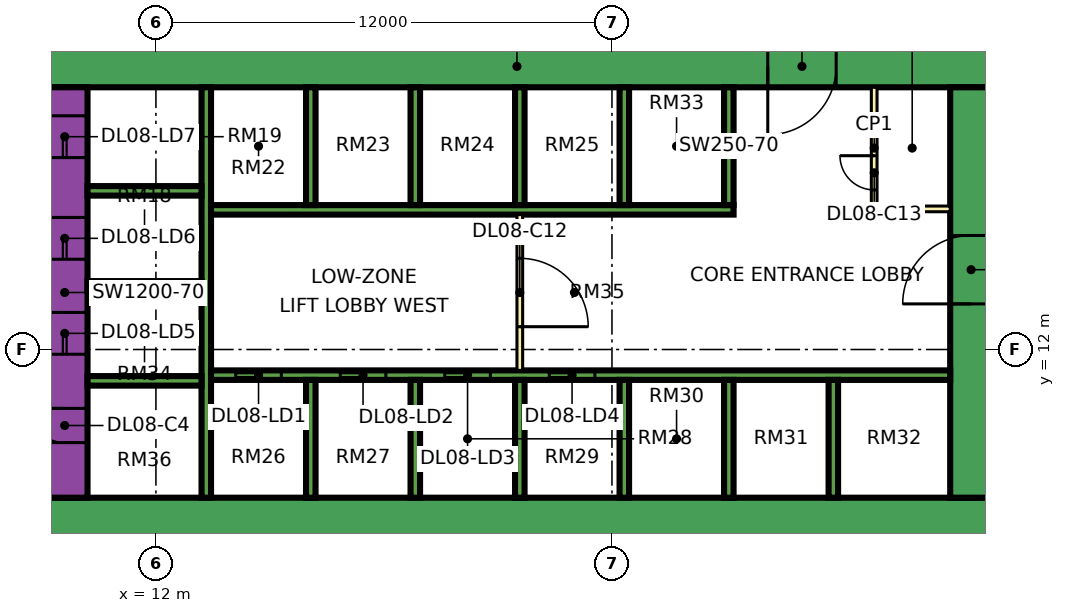
"""IFC4 building model, lengths in metres.
Left out: names, types, materials, properties, quantities, classifications, styles, units other than length and angle.
Written with IfcOpenShell. Run it as: python <this file> out.ifc"""

import sys

from ifc_helpers import new_model, si_unit, direction, frame, frame_2d, origin, place, context, subcontext, project, spatial, rectangle, extrude, element, fill, save


model = new_model("IFC4")
c1 = context("Model", 3, precision=1e-05, world=origin(), true_north=direction((0.0, 1.0)))
c2 = subcontext(c1, "Body", "Model", "MODEL_VIEW")
j1 = project(units=[si_unit("LENGTHUNIT", "METRE"), si_unit("PLANEANGLEUNIT", "RADIAN")], contexts=[c1])
p1 = place(None, origin())
s1 = spatial("IfcSite", under=j1, at=p1, CompositionType="ELEMENT")
p2 = place(p1, origin())
s2 = spatial("IfcBuilding", under=s1, at=p2, CompositionType="ELEMENT")
p3 = place(p2, frame((0.0, 0.0, 45.15)))
s3 = spatial("IfcBuildingStorey", under=s2, at=p3, CompositionType="ELEMENT", Elevation=45.15)
p4 = place(p3, frame((9.0, 7.55, 0.0), z_axis=(0.0, 0.0, 1.0), x_axis=(1.0, 0.0, 0.0)))
e1 = element("IfcWall", 1, at=p4, inside=s3, PredefinedType="SHEAR", context=c2, shape_type="SweptSolid", body=[
    extrude(rectangle(XDim=25.0, YDim=1.1, at=frame_2d((12.5, 0.0))), origin(), (0.0, 0.0, 1.0), 3.75),
])
p5 = place(p3, frame((9.0, 19.45, 0.0), z_axis=(0.0, 0.0, 1.0), x_axis=(1.0, 0.0, 0.0)))
e2 = element("IfcWall", 2, at=p5, inside=s3, PredefinedType="SHEAR", context=c2, shape_type="SweptSolid", body=[
    extrude(rectangle(XDim=25.0, YDim=1.1, at=frame_2d((12.5, 0.0))), origin(), (0.0, 0.0, 1.0), 3.75),
])
p6 = place(p5, frame((19.1, 0.0, 0.0)))
e3 = element("IfcOpeningElement", 3, at=p6, cuts=e2, PredefinedType="OPENING", context=c2, shape_type="SweptSolid", body=[
    extrude(rectangle(XDim=1.8, YDim=2.4, at=frame_2d((0.9, 1.2))), frame((0.0, 0.56, 0.0), z_axis=(0.0, -1.0, 0.0), x_axis=(1.0, 0.0, 0.0)), (0.0, 0.0, 1.0), 1.12),
])
p7 = place(p3, frame((9.6, 8.1, 0.0), z_axis=(0.0, 0.0, 1.0), x_axis=(0.0, 1.0, 0.0)))
e4 = element("IfcWall", 4, at=p7, inside=s3, PredefinedType="SHEAR", context=c2, shape_type="SweptSolid", body=[
    extrude(rectangle(XDim=10.8, YDim=1.2, at=frame_2d((5.4, 0.0))), origin(), (0.0, 0.0, 1.0), 3.75),
])
p8 = place(p7, frame((3.775, 0.0, 0.0)))
e5 = element("IfcOpeningElement", 5, at=p8, cuts=e4, PredefinedType="OPENING", context=c2, shape_type="SweptSolid", body=[
    extrude(rectangle(XDim=1.1, YDim=2.2, at=frame_2d((0.55, 1.1))), frame((0.0, 0.61, 0.0), z_axis=(0.0, -1.0, 0.0), x_axis=(1.0, 0.0, 0.0)), (0.0, 0.0, 1.0), 1.22),
])
p9 = place(p7, frame((6.275, 0.0, 0.0)))
e6 = element("IfcOpeningElement", 6, at=p9, cuts=e4, PredefinedType="OPENING", context=c2, shape_type="SweptSolid", body=[
    extrude(rectangle(XDim=1.1, YDim=2.2, at=frame_2d((0.55, 1.1))), frame((0.0, 0.61, 0.0), z_axis=(0.0, -1.0, 0.0), x_axis=(1.0, 0.0, 0.0)), (0.0, 0.0, 1.0), 1.22),
])
p10 = place(p7, frame((8.95, 0.0, 0.0)))
e7 = element("IfcOpeningElement", 7, at=p10, cuts=e4, PredefinedType="OPENING", context=c2, shape_type="SweptSolid", body=[
    extrude(rectangle(XDim=1.1, YDim=2.2, at=frame_2d((0.55, 1.1))), frame((0.0, 0.61, 0.0), z_axis=(0.0, -1.0, 0.0), x_axis=(1.0, 0.0, 0.0)), (0.0, 0.0, 1.0), 1.22),
])
p11 = place(p7, frame((1.45, 0.0, 0.0)))
e8 = element("IfcOpeningElement", 8, at=p11, cuts=e4, PredefinedType="OPENING", context=c2, shape_type="SweptSolid", body=[
    extrude(rectangle(XDim=0.9, YDim=2.1, at=frame_2d((0.45, 1.05))), frame((0.0, 0.61, 0.0), z_axis=(0.0, -1.0, 0.0), x_axis=(1.0, 0.0, 0.0)), (0.0, 0.0, 1.0), 1.22),
])
p12 = place(p3, frame((33.45, 8.1, 0.0), z_axis=(0.0, 0.0, 1.0), x_axis=(0.0, 1.0, 0.0)))
e9 = element("IfcWall", 9, at=p12, inside=s3, PredefinedType="SHEAR", context=c2, shape_type="SweptSolid", body=[
    extrude(rectangle(XDim=10.8, YDim=1.1, at=frame_2d((5.4, 0.0))), origin(), (0.0, 0.0, 1.0), 3.75),
])
p13 = place(p12, frame((5.1, 0.0, 0.0)))
e10 = element("IfcOpeningElement", 10, at=p13, cuts=e9, PredefinedType="OPENING", context=c2, shape_type="SweptSolid", body=[
    extrude(rectangle(XDim=1.8, YDim=2.4, at=frame_2d((0.9, 1.2))), frame((0.0, 0.56, 0.0), z_axis=(0.0, -1.0, 0.0), x_axis=(1.0, 0.0, 0.0)), (0.0, 0.0, 1.0), 1.12),
])
p14 = place(p3, frame((13.325, 8.1, 0.0), z_axis=(0.0, 0.0, 1.0), x_axis=(0.0, 1.0, 0.0)))
e11 = element("IfcWall", 11, at=p14, inside=s3, PredefinedType="SHEAR", context=c2, shape_type="SweptSolid", body=[
    extrude(rectangle(XDim=10.8, YDim=0.25, at=frame_2d((5.4, 0.0))), origin(), (0.0, 0.0, 1.0), 3.75),
])
p15 = place(p3, frame((13.45, 11.325, 0.0), z_axis=(0.0, 0.0, 1.0), x_axis=(1.0, 0.0, 0.0)))
e12 = element("IfcWall", 12, at=p15, inside=s3, PredefinedType="SHEAR", context=c2, shape_type="SweptSolid", body=[
    extrude(rectangle(XDim=19.45, YDim=0.25, at=frame_2d((9.725, 0.0))), origin(), (0.0, 0.0, 1.0), 3.75),
])
p16 = place(p15, frame((0.65, 0.0, 0.0)))
e13 = element("IfcOpeningElement", 13, at=p16, cuts=e12, PredefinedType="OPENING", context=c2, shape_type="SweptSolid", body=[
    extrude(rectangle(XDim=1.2, YDim=2.2, at=frame_2d((0.6, 1.1))), frame((0.0, 0.135, 0.0), z_axis=(0.0, -1.0, 0.0), x_axis=(1.0, 0.0, 0.0)), (0.0, 0.0, 1.0), 0.27),
])
p17 = place(p15, frame((3.4, 0.0, 0.0)))
e14 = element("IfcOpeningElement", 14, at=p17, cuts=e12, PredefinedType="OPENING", context=c2, shape_type="SweptSolid", body=[
    extrude(rectangle(XDim=1.2, YDim=2.2, at=frame_2d((0.6, 1.1))), frame((0.0, 0.135, 0.0), z_axis=(0.0, -1.0, 0.0), x_axis=(1.0, 0.0, 0.0)), (0.0, 0.0, 1.0), 0.27),
])
p18 = place(p15, frame((6.15, 0.0, 0.0)))
e15 = element("IfcOpeningElement", 15, at=p18, cuts=e12, PredefinedType="OPENING", context=c2, shape_type="SweptSolid", body=[
    extrude(rectangle(XDim=1.2, YDim=2.2, at=frame_2d((0.6, 1.1))), frame((0.0, 0.135, 0.0), z_axis=(0.0, -1.0, 0.0), x_axis=(1.0, 0.0, 0.0)), (0.0, 0.0, 1.0), 0.27),
])
p19 = place(p15, frame((8.9, 0.0, 0.0)))
e16 = element("IfcOpeningElement", 16, at=p19, cuts=e12, PredefinedType="OPENING", context=c2, shape_type="SweptSolid", body=[
    extrude(rectangle(XDim=1.2, YDim=2.2, at=frame_2d((0.6, 1.1))), frame((0.0, 0.135, 0.0), z_axis=(0.0, -1.0, 0.0), x_axis=(1.0, 0.0, 0.0)), (0.0, 0.0, 1.0), 0.27),
])
p20 = place(p3, frame((13.45, 15.675, 0.0), z_axis=(0.0, 0.0, 1.0), x_axis=(1.0, 0.0, 0.0)))
e17 = element("IfcWall", 17, at=p20, inside=s3, PredefinedType="SHEAR", context=c2, shape_type="SweptSolid", body=[
    extrude(rectangle(XDim=13.75, YDim=0.25, at=frame_2d((6.875, 0.0))), origin(), (0.0, 0.0, 1.0), 3.75),
])
for number, where, z_axis, x_axis in (
    (18, (10.2, 11.175, 0.0), (0.0, 0.0, 1.0), (1.0, 0.0, 0.0)),
    (19, (10.2, 13.675, 0.0), (0.0, 0.0, 1.0), (1.0, 0.0, 0.0)),
    (20, (10.2, 16.175, 0.0), (0.0, 0.0, 1.0), (1.0, 0.0, 0.0)),
):
    element("IfcWall", number, at=place(p3, frame(where, z_axis=z_axis, x_axis=x_axis)), inside=s3, PredefinedType="SHEAR", context=c2, shape_type="SweptSolid", body=[
        extrude(rectangle(XDim=3.0, YDim=0.25, at=frame_2d((1.5, 0.0))), origin(), (0.0, 0.0, 1.0), 3.75),
    ])
for number, where, z_axis, x_axis in (
    (21, (16.075, 8.1, 0.0), (0.0, 0.0, 1.0), (0.0, 1.0, 0.0)),
    (22, (18.825, 8.1, 0.0), (0.0, 0.0, 1.0), (0.0, 1.0, 0.0)),
    (23, (21.575, 8.1, 0.0), (0.0, 0.0, 1.0), (0.0, 1.0, 0.0)),
    (24, (24.325, 8.1, 0.0), (0.0, 0.0, 1.0), (0.0, 1.0, 0.0)),
    (25, (27.075, 8.1, 0.0), (0.0, 0.0, 1.0), (0.0, 1.0, 0.0)),
    (26, (29.825, 8.1, 0.0), (0.0, 0.0, 1.0), (0.0, 1.0, 0.0)),
    (27, (16.075, 15.8, 0.0), (0.0, 0.0, 1.0), (0.0, 1.0, 0.0)),
    (28, (18.825, 15.8, 0.0), (0.0, 0.0, 1.0), (0.0, 1.0, 0.0)),
    (29, (21.575, 15.8, 0.0), (0.0, 0.0, 1.0), (0.0, 1.0, 0.0)),
    (30, (24.325, 15.8, 0.0), (0.0, 0.0, 1.0), (0.0, 1.0, 0.0)),
    (31, (27.075, 15.8, 0.0), (0.0, 0.0, 1.0), (0.0, 1.0, 0.0)),
):
    element("IfcWall", number, at=place(p3, frame(where, z_axis=z_axis, x_axis=x_axis)), inside=s3, PredefinedType="SHEAR", context=c2, shape_type="SweptSolid", body=[
        extrude(rectangle(XDim=3.1, YDim=0.25, at=frame_2d((1.55, 0.0))), origin(), (0.0, 0.0, 1.0), 3.75),
    ])
p21 = place(p3, frame((-1.447, 12.553, 0.0), z_axis=(0.0, 0.0, 1.0), x_axis=(0.707106781187, -0.707106781187, 0.0)))
e32 = element("IfcWall", 32, at=p21, inside=s3, PredefinedType="SOLIDWALL", context=c2, shape_type="SweptSolid", body=[
    extrude(rectangle(XDim=19.799, YDim=0.15, at=frame_2d((9.899, 0.0))), origin(), (0.0, 0.0, 1.0), 3.35),
])
p22 = place(p21, frame((2.212, 0.0, 0.45)))
e33 = element("IfcOpeningElement", 33, at=p22, cuts=e32, PredefinedType="OPENING", context=c2, shape_type="SweptSolid", body=[
    extrude(rectangle(XDim=3.0, YDim=2.4, at=frame_2d((1.5, 1.2))), frame((0.0, 0.085, 0.0), z_axis=(0.0, -1.0, 0.0), x_axis=(1.0, 0.0, 0.0)), (0.0, 0.0, 1.0), 0.17),
])
p23 = place(p21, frame((10.216, 0.0, 0.45)))
e34 = element("IfcOpeningElement", 34, at=p23, cuts=e32, PredefinedType="OPENING", context=c2, shape_type="SweptSolid", body=[
    extrude(rectangle(XDim=3.0, YDim=2.4, at=frame_2d((1.5, 1.2))), frame((0.0, 0.085, 0.0), z_axis=(0.0, -1.0, 0.0), x_axis=(1.0, 0.0, 0.0)), (0.0, 0.0, 1.0), 0.17),
])
p24 = place(p3, frame((21.575, 11.45, 0.0), z_axis=(0.0, 0.0, 1.0), x_axis=(0.0, 1.0, 0.0)))
e35 = element("IfcWall", 35, at=p24, inside=s3, PredefinedType="PARTITIONING", context=c2, shape_type="SweptSolid", body=[
    extrude(rectangle(XDim=4.1, YDim=0.15, at=frame_2d((2.05, 0.0))), origin(), (0.0, 0.0, 1.0), 3.35),
])
p25 = place(p24, frame((1.15, 0.0, 0.0)))
e36 = element("IfcOpeningElement", 36, at=p25, cuts=e35, PredefinedType="OPENING", context=c2, shape_type="SweptSolid", body=[
    extrude(rectangle(XDim=1.8, YDim=2.4, at=frame_2d((0.9, 1.2))), frame((0.0, 0.085, 0.0), z_axis=(0.0, -1.0, 0.0), x_axis=(1.0, 0.0, 0.0)), (0.0, 0.0, 1.0), 0.17),
])
p26 = place(p3, frame((30.9, 15.7, 0.0), z_axis=(0.0, 0.0, 1.0), x_axis=(0.0, 1.0, 0.0)))
e37 = element("IfcWall", 37, at=p26, inside=s3, PredefinedType="PARTITIONING", context=c2, shape_type="SweptSolid", body=[
    extrude(rectangle(XDim=3.2, YDim=0.15, at=frame_2d((1.6, 0.0))), origin(), (0.0, 0.0, 1.0), 3.35),
])
p27 = place(p26, frame((0.5, 0.0, 0.0)))
e38 = element("IfcOpeningElement", 38, at=p27, cuts=e37, PredefinedType="OPENING", context=c2, shape_type="SweptSolid", body=[
    extrude(rectangle(XDim=0.9, YDim=2.1, at=frame_2d((0.45, 1.05))), frame((0.0, 0.085, 0.0), z_axis=(0.0, -1.0, 0.0), x_axis=(1.0, 0.0, 0.0)), (0.0, 0.0, 1.0), 0.17),
])
p28 = place(p3, frame((30.9, 15.7, 0.0), z_axis=(0.0, 0.0, 1.0), x_axis=(1.0, 0.0, 0.0)))
e39 = element("IfcWall", 39, at=p28, inside=s3, PredefinedType="PARTITIONING", context=c2, shape_type="SweptSolid", body=[
    extrude(rectangle(XDim=2.0, YDim=0.15, at=frame_2d((1.0, 0.0))), origin(), (0.0, 0.0, 1.0), 3.35),
])
p29 = place(p16, origin())
e40 = element("IfcDoor", 40, at=p29, inside=s3, OperationType="DOUBLE_DOOR_SLIDING", PredefinedType="DOOR", context=c2, shape_type="SweptSolid", body=[
    extrude(rectangle(XDim=1.2, YDim=2.2, at=frame_2d((0.6, 1.1))), frame((0.0, 0.025, 0.0), z_axis=(0.0, -1.0, 0.0), x_axis=(1.0, 0.0, 0.0)), (0.0, 0.0, 1.0), 0.05),
])
fill(e13, e40)
p30 = place(p17, origin())
e41 = element("IfcDoor", 41, at=p30, inside=s3, OperationType="DOUBLE_DOOR_SLIDING", PredefinedType="DOOR", context=c2, shape_type="SweptSolid", body=[
    extrude(rectangle(XDim=1.2, YDim=2.2, at=frame_2d((0.6, 1.1))), frame((0.0, 0.025, 0.0), z_axis=(0.0, -1.0, 0.0), x_axis=(1.0, 0.0, 0.0)), (0.0, 0.0, 1.0), 0.05),
])
fill(e14, e41)
p31 = place(p18, origin())
e42 = element("IfcDoor", 42, at=p31, inside=s3, OperationType="DOUBLE_DOOR_SLIDING", PredefinedType="DOOR", context=c2, shape_type="SweptSolid", body=[
    extrude(rectangle(XDim=1.2, YDim=2.2, at=frame_2d((0.6, 1.1))), frame((0.0, 0.025, 0.0), z_axis=(0.0, -1.0, 0.0), x_axis=(1.0, 0.0, 0.0)), (0.0, 0.0, 1.0), 0.05),
])
fill(e15, e42)
p32 = place(p19, origin())
e43 = element("IfcDoor", 43, at=p32, inside=s3, OperationType="DOUBLE_DOOR_SLIDING", PredefinedType="DOOR", context=c2, shape_type="SweptSolid", body=[
    extrude(rectangle(XDim=1.2, YDim=2.2, at=frame_2d((0.6, 1.1))), frame((0.0, 0.025, 0.0), z_axis=(0.0, -1.0, 0.0), x_axis=(1.0, 0.0, 0.0)), (0.0, 0.0, 1.0), 0.05),
])
fill(e16, e43)
p33 = place(p8, origin())
e44 = element("IfcDoor", 44, at=p33, inside=s3, OperationType="DOUBLE_DOOR_SLIDING", PredefinedType="DOOR", context=c2, shape_type="SweptSolid", body=[
    extrude(rectangle(XDim=1.1, YDim=2.2, at=frame_2d((0.55, 1.1))), frame((0.0, 0.025, 0.0), z_axis=(0.0, -1.0, 0.0), x_axis=(1.0, 0.0, 0.0)), (0.0, 0.0, 1.0), 0.05),
])
fill(e5, e44)
p34 = place(p9, origin())
e45 = element("IfcDoor", 45, at=p34, inside=s3, OperationType="DOUBLE_DOOR_SLIDING", PredefinedType="DOOR", context=c2, shape_type="SweptSolid", body=[
    extrude(rectangle(XDim=1.1, YDim=2.2, at=frame_2d((0.55, 1.1))), frame((0.0, 0.025, 0.0), z_axis=(0.0, -1.0, 0.0), x_axis=(1.0, 0.0, 0.0)), (0.0, 0.0, 1.0), 0.05),
])
fill(e6, e45)
p35 = place(p10, origin())
e46 = element("IfcDoor", 46, at=p35, inside=s3, OperationType="DOUBLE_DOOR_SLIDING", PredefinedType="DOOR", context=c2, shape_type="SweptSolid", body=[
    extrude(rectangle(XDim=1.1, YDim=2.2, at=frame_2d((0.55, 1.1))), frame((0.0, 0.025, 0.0), z_axis=(0.0, -1.0, 0.0), x_axis=(1.0, 0.0, 0.0)), (0.0, 0.0, 1.0), 0.05),
])
fill(e7, e46)
p36 = place(p13, origin())
e47 = element("IfcDoor", 47, at=p36, inside=s3, OperationType="DOUBLE_DOOR_SINGLE_SWING", PredefinedType="DOOR", context=c2, shape_type="SweptSolid", body=[
    extrude(rectangle(XDim=1.8, YDim=2.4, at=frame_2d((0.9, 1.2))), frame((0.0, 0.025, 0.0), z_axis=(0.0, -1.0, 0.0), x_axis=(1.0, 0.0, 0.0)), (0.0, 0.0, 1.0), 0.05),
])
fill(e10, e47)
p37 = place(p6, frame((1.8, 0.0, 0.0), z_axis=(0.0, 0.0, 1.0), x_axis=(-1.0, 0.0, 0.0)))
e48 = element("IfcDoor", 48, at=p37, inside=s3, OperationType="DOUBLE_DOOR_SINGLE_SWING", PredefinedType="DOOR", context=c2, shape_type="SweptSolid", body=[
    extrude(rectangle(XDim=1.8, YDim=2.4, at=frame_2d((0.9, 1.2))), frame((0.0, 0.025, 0.0), z_axis=(0.0, -1.0, 0.0), x_axis=(1.0, 0.0, 0.0)), (0.0, 0.0, 1.0), 0.05),
])
fill(e3, e48)
p38 = place(p11, frame((0.9, 0.0, 0.0), z_axis=(0.0, 0.0, 1.0), x_axis=(-1.0, 0.0, 0.0)))
e49 = element("IfcDoor", 49, at=p38, inside=s3, OperationType="SINGLE_SWING_RIGHT", PredefinedType="DOOR", context=c2, shape_type="SweptSolid", body=[
    extrude(rectangle(XDim=0.9, YDim=2.1, at=frame_2d((0.45, 1.05))), frame((0.0, 0.025, 0.0), z_axis=(0.0, -1.0, 0.0), x_axis=(1.0, 0.0, 0.0)), (0.0, 0.0, 1.0), 0.05),
])
fill(e8, e49)
p39 = place(p25, frame((1.8, 0.0, 0.0), z_axis=(0.0, 0.0, 1.0), x_axis=(-1.0, 0.0, 0.0)))
e50 = element("IfcDoor", 50, at=p39, inside=s3, OperationType="DOUBLE_DOOR_SINGLE_SWING", PredefinedType="DOOR", context=c2, shape_type="SweptSolid", body=[
    extrude(rectangle(XDim=1.8, YDim=2.4, at=frame_2d((0.9, 1.2))), frame((0.0, 0.025, 0.0), z_axis=(0.0, -1.0, 0.0), x_axis=(1.0, 0.0, 0.0)), (0.0, 0.0, 1.0), 0.05),
])
fill(e36, e50)
p40 = place(p27, frame((0.9, 0.0, 0.0), z_axis=(0.0, 0.0, 1.0), x_axis=(-1.0, 0.0, 0.0)))
e51 = element("IfcDoor", 51, at=p40, inside=s3, OperationType="SINGLE_SWING_RIGHT", PredefinedType="DOOR", context=c2, shape_type="SweptSolid", body=[
    extrude(rectangle(XDim=0.9, YDim=2.1, at=frame_2d((0.45, 1.05))), frame((0.0, 0.025, 0.0), z_axis=(0.0, -1.0, 0.0), x_axis=(1.0, 0.0, 0.0)), (0.0, 0.0, 1.0), 0.05),
])
fill(e38, e51)
save(model, sys.argv[1])
